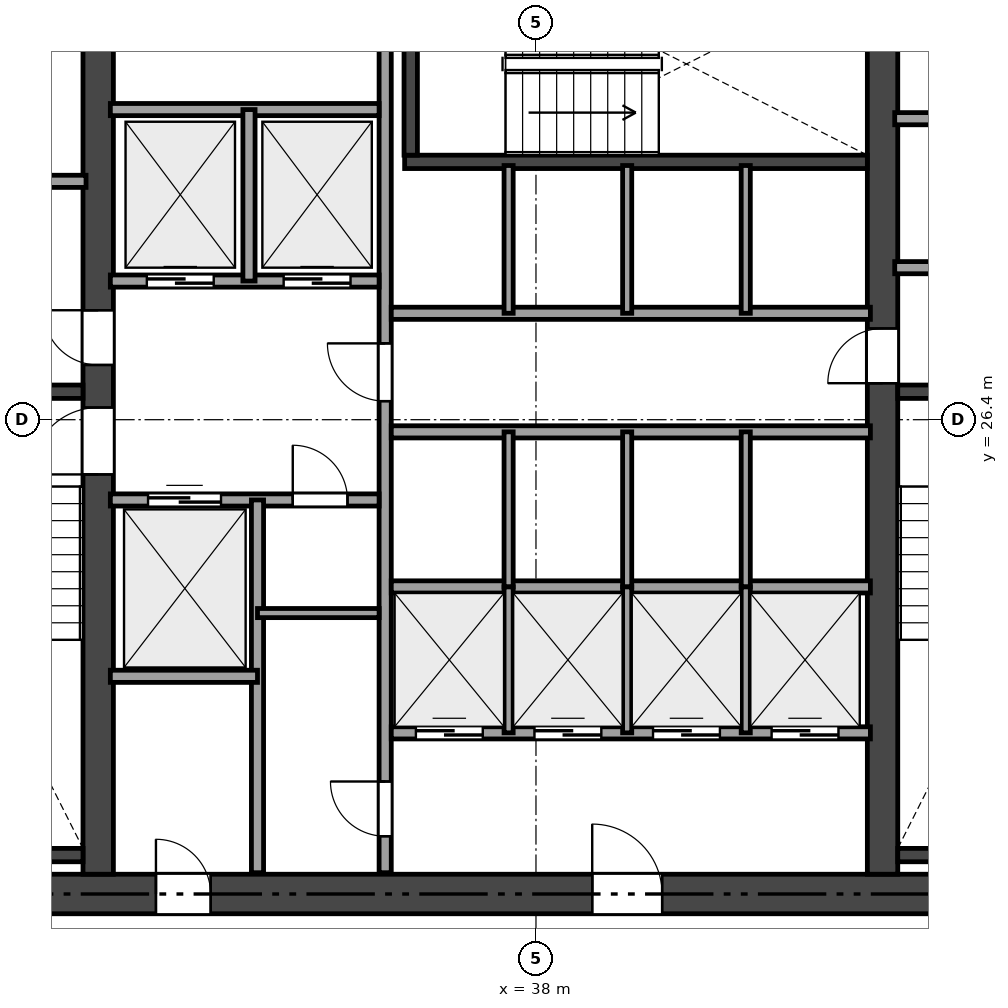
"""IFC4 building model, lengths in metres.
Left out: names, types, materials, properties, quantities, classifications, styles, units other than length and angle.
Written with IfcOpenShell. Run it as: python <this file> out.ifc"""

import sys

from ifc_helpers import new_model, si_unit, direction, frame, frame_2d, origin, place, context, subcontext, project, spatial, rectangle, extrude, element, fill, save


model = new_model("IFC4")
c1 = context("Model", 3, precision=1e-05, world=origin(), true_north=direction((0.0, 1.0)))
c2 = subcontext(c1, "Body", "Model", "MODEL_VIEW")
j1 = project(units=[si_unit("LENGTHUNIT", "METRE"), si_unit("PLANEANGLEUNIT", "RADIAN")], contexts=[c1])
p1 = place(None, origin())
s1 = spatial("IfcSite", under=j1, at=p1, CompositionType="ELEMENT")
p2 = place(p1, origin())
s2 = spatial("IfcBuilding", under=s1, at=p2, CompositionType="ELEMENT")
p3 = place(p2, frame((0.0, 0.0, 51.15)))
s3 = spatial("IfcBuildingStorey", under=s2, at=p3, CompositionType="ELEMENT", Elevation=51.15)
p4 = place(p3, frame((26.475, 18.6, 0.0), z_axis=(0.0, 0.0, 1.0), x_axis=(1.0, 0.0, 0.0)))
e1 = element("IfcWall", 1, at=p4, inside=s3, PredefinedType="SHEAR", context=c2, shape_type="SweptSolid", body=[
    extrude(rectangle(XDim=21.45, YDim=0.65, at=frame_2d((10.725, 0.0))), origin(), (0.0, 0.0, 1.0), 3.17),
])
p5 = place(p4, frame((12.45, 0.0, 0.0)))
e2 = element("IfcOpeningElement", 2, at=p5, cuts=e1, PredefinedType="OPENING", context=c2, shape_type="SweptSolid", body=[
    extrude(rectangle(XDim=1.15, YDim=2.15, at=frame_2d((0.575, 1.075))), frame((0.0, 0.335, 0.0), z_axis=(0.0, -1.0, 0.0), x_axis=(1.0, 0.0, 0.0)), (0.0, 0.0, 1.0), 0.67),
])
p6 = place(p4, frame((5.275, 0.0, 0.0)))
e3 = element("IfcOpeningElement", 3, at=p6, cuts=e1, PredefinedType="OPENING", context=c2, shape_type="SweptSolid", body=[
    extrude(rectangle(XDim=0.9, YDim=2.1, at=frame_2d((0.45, 1.05))), frame((0.0, 0.335, 0.0), z_axis=(0.0, -1.0, 0.0), x_axis=(1.0, 0.0, 0.0)), (0.0, 0.0, 1.0), 0.67),
])
p7 = place(p3, frame((30.8, 18.925, 0.0), z_axis=(0.0, 0.0, 1.0), x_axis=(0.0, 1.0, 0.0)))
e4 = element("IfcWall", 4, at=p7, inside=s3, PredefinedType="SHEAR", context=c2, shape_type="SweptSolid", body=[
    extrude(rectangle(XDim=14.95, YDim=0.5, at=frame_2d((7.475, 0.0))), origin(), (0.0, 0.0, 1.0), 3.17),
])
p8 = place(p7, frame((6.575, 0.0, 0.0)))
e5 = element("IfcOpeningElement", 5, at=p8, cuts=e4, PredefinedType="OPENING", context=c2, shape_type="SweptSolid", body=[
    extrude(rectangle(XDim=1.1, YDim=2.15, at=frame_2d((0.55, 1.075))), frame((0.0, 0.26, 0.0), z_axis=(0.0, -1.0, 0.0), x_axis=(1.0, 0.0, 0.0)), (0.0, 0.0, 1.0), 0.52),
])
p9 = place(p7, frame((8.375, 0.0, 0.0)))
e6 = element("IfcOpeningElement", 6, at=p9, cuts=e4, PredefinedType="OPENING", context=c2, shape_type="SweptSolid", body=[
    extrude(rectangle(XDim=0.9, YDim=2.1, at=frame_2d((0.45, 1.05))), frame((0.0, 0.26, 0.0), z_axis=(0.0, -1.0, 0.0), x_axis=(1.0, 0.0, 0.0)), (0.0, 0.0, 1.0), 0.52),
])
p10 = place(p3, frame((43.7, 18.925, 0.0), z_axis=(0.0, 0.0, 1.0), x_axis=(0.0, 1.0, 0.0)))
e7 = element("IfcWall", 7, at=p10, inside=s3, PredefinedType="SHEAR", context=c2, shape_type="SweptSolid", body=[
    extrude(rectangle(XDim=14.95, YDim=0.5, at=frame_2d((7.475, 0.0))), origin(), (0.0, 0.0, 1.0), 3.17),
])
p11 = place(p10, frame((8.075, 0.0, 0.0)))
e8 = element("IfcOpeningElement", 8, at=p11, cuts=e7, PredefinedType="OPENING", context=c2, shape_type="SweptSolid", body=[
    extrude(rectangle(XDim=0.9, YDim=2.1, at=frame_2d((0.45, 1.05))), frame((0.0, 0.26, 0.0), z_axis=(0.0, -1.0, 0.0), x_axis=(1.0, 0.0, 0.0)), (0.0, 0.0, 1.0), 0.52),
])
for number, where, z_axis, x_axis in (
    (9, (27.125, 26.86, 0.0), (0.0, 0.0, 1.0), (1.0, 0.0, 0.0)),
    (10, (27.125, 19.24, 0.0), (0.0, 0.0, 1.0), (1.0, 0.0, 0.0)),
):
    element("IfcWall", number, at=place(p3, frame(where, z_axis=z_axis, x_axis=x_axis)), inside=s3, PredefinedType="SHEAR", context=c2, shape_type="SweptSolid", body=[
        extrude(rectangle(XDim=3.425, YDim=0.22, at=frame_2d((1.712, 0.0))), origin(), (0.0, 0.0, 1.0), 3.17),
    ])
for number, where, z_axis, x_axis in (
    (11, (43.95, 26.86, 0.0), (0.0, 0.0, 1.0), (1.0, 0.0, 0.0)),
    (12, (43.95, 19.24, 0.0), (0.0, 0.0, 1.0), (1.0, 0.0, 0.0)),
):
    element("IfcWall", number, at=place(p3, frame(where, z_axis=z_axis, x_axis=x_axis)), inside=s3, PredefinedType="SHEAR", context=c2, shape_type="SweptSolid", body=[
        extrude(rectangle(XDim=3.325, YDim=0.22, at=frame_2d((1.663, 0.0))), origin(), (0.0, 0.0, 1.0), 3.17),
    ])
p12 = place(p3, frame((35.84, 30.64, 0.0), z_axis=(0.0, 0.0, 1.0), x_axis=(1.0, 0.0, 0.0)))
e13 = element("IfcWall", 13, at=p12, inside=s3, PredefinedType="SHEAR", context=c2, shape_type="SweptSolid", body=[
    extrude(rectangle(XDim=7.61, YDim=0.22, at=frame_2d((3.805, 0.0))), origin(), (0.0, 0.0, 1.0), 3.17),
])
p13 = place(p3, frame((35.94, 30.75, 0.0), z_axis=(0.0, 0.0, 1.0), x_axis=(0.0, 1.0, 0.0)))
e14 = element("IfcWall", 14, at=p13, inside=s3, PredefinedType="SHEAR", context=c2, shape_type="SweptSolid", body=[
    extrude(rectangle(XDim=3.125, YDim=0.22, at=frame_2d((1.562, 0.0))), origin(), (0.0, 0.0, 1.0), 3.17),
])
p14 = place(p3, frame((27.15, 30.32, 0.0), z_axis=(0.0, 0.0, 1.0), x_axis=(1.0, 0.0, 0.0)))
e15 = element("IfcWall", 15, at=p14, inside=s3, PredefinedType="SOLIDWALL", context=c2, shape_type="SweptSolid", body=[
    extrude(rectangle(XDim=3.45, YDim=0.2, at=frame_2d((1.725, 0.0))), origin(), (0.0, 0.0, 1.0), 3.17),
])
p15 = place(p3, frame((43.9, 28.9, 0.0), z_axis=(0.0, 0.0, 1.0), x_axis=(1.0, 0.0, 0.0)))
e16 = element("IfcWall", 16, at=p15, inside=s3, PredefinedType="SOLIDWALL", context=c2, shape_type="SweptSolid", body=[
    extrude(rectangle(XDim=3.35, YDim=0.2, at=frame_2d((1.675, 0.0))), origin(), (0.0, 0.0, 1.0), 3.17),
])
p16 = place(p15, frame((1.15, 0.0, 0.0)))
e17 = element("IfcOpeningElement", 17, at=p16, cuts=e16, PredefinedType="OPENING", context=c2, shape_type="SweptSolid", body=[
    extrude(rectangle(XDim=0.9, YDim=2.1, at=frame_2d((0.45, 1.05))), frame((0.0, 0.11, 0.0), z_axis=(0.0, -1.0, 0.0), x_axis=(1.0, 0.0, 0.0)), (0.0, 0.0, 1.0), 0.22),
])
p17 = place(p3, frame((43.9, 31.35, 0.0), z_axis=(0.0, 0.0, 1.0), x_axis=(1.0, 0.0, 0.0)))
e18 = element("IfcWall", 18, at=p17, inside=s3, PredefinedType="SOLIDWALL", context=c2, shape_type="SweptSolid", body=[
    extrude(rectangle(XDim=3.35, YDim=0.2, at=frame_2d((1.675, 0.0))), origin(), (0.0, 0.0, 1.0), 3.17),
])
p18 = place(p3, frame((35.52, 18.95, 0.0), z_axis=(0.0, 0.0, 1.0), x_axis=(0.0, 1.0, 0.0)))
e19 = element("IfcWall", 19, at=p18, inside=s3, PredefinedType="SOLIDWALL", context=c2, shape_type="SweptSolid", body=[
    extrude(rectangle(XDim=14.9, YDim=0.2, at=frame_2d((7.45, 0.0))), origin(), (0.0, 0.0, 1.0), 2.691),
])
p19 = place(p18, frame((7.755, 0.0, 0.0)))
e20 = element("IfcOpeningElement", 20, at=p19, cuts=e19, PredefinedType="OPENING", context=c2, shape_type="SweptSolid", body=[
    extrude(rectangle(XDim=0.95, YDim=2.15, at=frame_2d((0.475, 1.075))), frame((0.0, 0.11, 0.0), z_axis=(0.0, -1.0, 0.0), x_axis=(1.0, 0.0, 0.0)), (0.0, 0.0, 1.0), 0.22),
])
p20 = place(p18, frame((0.6, 0.0, 0.0)))
e21 = element("IfcOpeningElement", 21, at=p20, cuts=e19, PredefinedType="OPENING", context=c2, shape_type="SweptSolid", body=[
    extrude(rectangle(XDim=0.9, YDim=2.1, at=frame_2d((0.45, 1.05))), frame((0.0, 0.11, 0.0), z_axis=(0.0, -1.0, 0.0), x_axis=(1.0, 0.0, 0.0)), (0.0, 0.0, 1.0), 0.22),
])
p21 = place(p3, frame((31.0, 28.68, 0.0), z_axis=(0.0, 0.0, 1.0), x_axis=(1.0, 0.0, 0.0)))
e22 = element("IfcWall", 22, at=p21, inside=s3, PredefinedType="SOLIDWALL", context=c2, shape_type="SweptSolid", body=[
    extrude(rectangle(XDim=4.42, YDim=0.2, at=frame_2d((2.21, 0.0))), origin(), (0.0, 0.0, 1.0), 3.17),
])
p22 = place(p21, frame((0.6, 0.0, 0.0)))
e23 = element("IfcOpeningElement", 23, at=p22, cuts=e22, PredefinedType="OPENING", context=c2, shape_type="SweptSolid", body=[
    extrude(rectangle(XDim=1.1, YDim=2.15, at=frame_2d((0.55, 1.075))), frame((0.0, 0.11, 0.0), z_axis=(0.0, -1.0, 0.0), x_axis=(1.0, 0.0, 0.0)), (0.0, 0.0, 1.0), 0.22),
])
p23 = place(p21, frame((2.85, 0.0, 0.0)))
e24 = element("IfcOpeningElement", 24, at=p23, cuts=e22, PredefinedType="OPENING", context=c2, shape_type="SweptSolid", body=[
    extrude(rectangle(XDim=1.1, YDim=2.15, at=frame_2d((0.55, 1.075))), frame((0.0, 0.11, 0.0), z_axis=(0.0, -1.0, 0.0), x_axis=(1.0, 0.0, 0.0)), (0.0, 0.0, 1.0), 0.22),
])
p24 = place(p3, frame((31.0, 31.5, 0.0), z_axis=(0.0, 0.0, 1.0), x_axis=(1.0, 0.0, 0.0)))
e25 = element("IfcWall", 25, at=p24, inside=s3, PredefinedType="SOLIDWALL", context=c2, shape_type="SweptSolid", body=[
    extrude(rectangle(XDim=4.42, YDim=0.2, at=frame_2d((2.21, 0.0))), origin(), (0.0, 0.0, 1.0), 3.17),
])
p25 = place(p3, frame((33.28, 28.68, 0.0), z_axis=(0.0, 0.0, 1.0), x_axis=(0.0, 1.0, 0.0)))
e26 = element("IfcWall", 26, at=p25, inside=s3, PredefinedType="SOLIDWALL", context=c2, shape_type="SweptSolid", body=[
    extrude(rectangle(XDim=2.82, YDim=0.2, at=frame_2d((1.41, 0.0))), origin(), (0.0, 0.0, 1.0), 3.17),
])
p26 = place(p3, frame((31.0, 25.08, 0.0), z_axis=(0.0, 0.0, 1.0), x_axis=(1.0, 0.0, 0.0)))
e27 = element("IfcWall", 27, at=p26, inside=s3, PredefinedType="SOLIDWALL", context=c2, shape_type="SweptSolid", body=[
    extrude(rectangle(XDim=4.42, YDim=0.2, at=frame_2d((2.21, 0.0))), origin(), (0.0, 0.0, 1.0), 3.17),
])
p27 = place(p26, frame((3.0, 0.0, 0.0)))
e28 = element("IfcOpeningElement", 28, at=p27, cuts=e27, PredefinedType="OPENING", context=c2, shape_type="SweptSolid", body=[
    extrude(rectangle(XDim=0.9, YDim=2.1, at=frame_2d((0.45, 1.05))), frame((0.0, 0.11, 0.0), z_axis=(0.0, -1.0, 0.0), x_axis=(1.0, 0.0, 0.0)), (0.0, 0.0, 1.0), 0.22),
])
p28 = place(p26, frame((0.62, 0.0, 0.0)))
e29 = element("IfcOpeningElement", 29, at=p28, cuts=e27, PredefinedType="OPENING", context=c2, shape_type="SweptSolid", body=[
    extrude(rectangle(XDim=1.2, YDim=2.15, at=frame_2d((0.6, 1.075))), frame((0.0, 0.11, 0.0), z_axis=(0.0, -1.0, 0.0), x_axis=(1.0, 0.0, 0.0)), (0.0, 0.0, 1.0), 0.22),
])
p29 = place(p3, frame((33.42, 18.95, 0.0), z_axis=(0.0, 0.0, 1.0), x_axis=(0.0, 1.0, 0.0)))
e30 = element("IfcWall", 30, at=p29, inside=s3, PredefinedType="SOLIDWALL", context=c2, shape_type="SweptSolid", body=[
    extrude(rectangle(XDim=6.13, YDim=0.2, at=frame_2d((3.065, 0.0))), origin(), (0.0, 0.0, 1.0), 2.691),
])
p30 = place(p3, frame((31.0, 22.18, 0.0), z_axis=(0.0, 0.0, 1.0), x_axis=(1.0, 0.0, 0.0)))
e31 = element("IfcWall", 31, at=p30, inside=s3, PredefinedType="SOLIDWALL", context=c2, shape_type="SweptSolid", body=[
    extrude(rectangle(XDim=2.42, YDim=0.2, at=frame_2d((1.21, 0.0))), origin(), (0.0, 0.0, 1.0), 3.17),
])
p31 = place(p3, frame((33.42, 23.22, 0.0), z_axis=(0.0, 0.0, 1.0), x_axis=(1.0, 0.0, 0.0)))
e32 = element("IfcWall", 32, at=p31, inside=s3, PredefinedType="PARTITIONING", context=c2, shape_type="SweptSolid", body=[
    extrude(rectangle(XDim=2.0, YDim=0.15, at=frame_2d((1.0, 0.0))), origin(), (0.0, 0.0, 1.0), 3.17),
])
for number, where, z_axis, x_axis in (
    (33, (35.62, 28.15, 0.0), (0.0, 0.0, 1.0), (1.0, 0.0, 0.0)),
    (34, (35.62, 26.2, 0.0), (0.0, 0.0, 1.0), (1.0, 0.0, 0.0)),
):
    element("IfcWall", number, at=place(p3, frame(where, z_axis=z_axis, x_axis=x_axis)), inside=s3, PredefinedType="SOLIDWALL", context=c2, shape_type="SweptSolid", body=[
        extrude(rectangle(XDim=7.88, YDim=0.2, at=frame_2d((3.94, 0.0))), origin(), (0.0, 0.0, 1.0), 3.17),
    ])
p32 = place(p3, frame((35.62, 23.65, 0.0), z_axis=(0.0, 0.0, 1.0), x_axis=(1.0, 0.0, 0.0)))
e35 = element("IfcWall", 35, at=p32, inside=s3, PredefinedType="SOLIDWALL", context=c2, shape_type="SweptSolid", body=[
    extrude(rectangle(XDim=7.88, YDim=0.2, at=frame_2d((3.94, 0.0))), origin(), (0.0, 0.0, 1.0), 2.691),
])
p33 = place(p3, frame((35.62, 21.25, 0.0), z_axis=(0.0, 0.0, 1.0), x_axis=(1.0, 0.0, 0.0)))
e36 = element("IfcWall", 36, at=p33, inside=s3, PredefinedType="SOLIDWALL", context=c2, shape_type="SweptSolid", body=[
    extrude(rectangle(XDim=7.88, YDim=0.2, at=frame_2d((3.94, 0.0))), origin(), (0.0, 0.0, 1.0), 3.17),
])
p34 = place(p33, frame((0.405, 0.0, 0.0)))
e37 = element("IfcOpeningElement", 37, at=p34, cuts=e36, PredefinedType="OPENING", context=c2, shape_type="SweptSolid", body=[
    extrude(rectangle(XDim=1.1, YDim=2.15, at=frame_2d((0.55, 1.075))), frame((0.0, 0.11, 0.0), z_axis=(0.0, -1.0, 0.0), x_axis=(1.0, 0.0, 0.0)), (0.0, 0.0, 1.0), 0.22),
])
p35 = place(p33, frame((2.355, 0.0, 0.0)))
e38 = element("IfcOpeningElement", 38, at=p35, cuts=e36, PredefinedType="OPENING", context=c2, shape_type="SweptSolid", body=[
    extrude(rectangle(XDim=1.1, YDim=2.15, at=frame_2d((0.55, 1.075))), frame((0.0, 0.11, 0.0), z_axis=(0.0, -1.0, 0.0), x_axis=(1.0, 0.0, 0.0)), (0.0, 0.0, 1.0), 0.22),
])
p36 = place(p33, frame((4.305, 0.0, 0.0)))
e39 = element("IfcOpeningElement", 39, at=p36, cuts=e36, PredefinedType="OPENING", context=c2, shape_type="SweptSolid", body=[
    extrude(rectangle(XDim=1.1, YDim=2.15, at=frame_2d((0.55, 1.075))), frame((0.0, 0.11, 0.0), z_axis=(0.0, -1.0, 0.0), x_axis=(1.0, 0.0, 0.0)), (0.0, 0.0, 1.0), 0.22),
])
p37 = place(p33, frame((6.255, 0.0, 0.0)))
e40 = element("IfcOpeningElement", 40, at=p37, cuts=e36, PredefinedType="OPENING", context=c2, shape_type="SweptSolid", body=[
    extrude(rectangle(XDim=1.1, YDim=2.15, at=frame_2d((0.55, 1.075))), frame((0.0, 0.11, 0.0), z_axis=(0.0, -1.0, 0.0), x_axis=(1.0, 0.0, 0.0)), (0.0, 0.0, 1.0), 0.22),
])
for number, where, z_axis, x_axis in (
    (41, (37.55, 28.15, 0.0), (0.0, 0.0, 1.0), (0.0, 1.0, 0.0)),
    (42, (39.5, 28.15, 0.0), (0.0, 0.0, 1.0), (0.0, 1.0, 0.0)),
    (43, (41.45, 28.15, 0.0), (0.0, 0.0, 1.0), (0.0, 1.0, 0.0)),
):
    element("IfcWall", number, at=place(p3, frame(where, z_axis=z_axis, x_axis=x_axis)), inside=s3, PredefinedType="PARTITIONING", context=c2, shape_type="SweptSolid", body=[
        extrude(rectangle(XDim=2.43, YDim=0.15, at=frame_2d((1.215, 0.0))), origin(), (0.0, 0.0, 1.0), 3.17),
    ])
for number, where, z_axis, x_axis in (
    (44, (37.55, 23.65, 0.0), (0.0, 0.0, 1.0), (0.0, 1.0, 0.0)),
    (45, (39.5, 23.65, 0.0), (0.0, 0.0, 1.0), (0.0, 1.0, 0.0)),
    (46, (41.45, 23.65, 0.0), (0.0, 0.0, 1.0), (0.0, 1.0, 0.0)),
):
    element("IfcWall", number, at=place(p3, frame(where, z_axis=z_axis, x_axis=x_axis)), inside=s3, PredefinedType="PARTITIONING", context=c2, shape_type="SweptSolid", body=[
        extrude(rectangle(XDim=2.55, YDim=0.15, at=frame_2d((1.275, 0.0))), origin(), (0.0, 0.0, 1.0), 2.691),
    ])
for number, where, z_axis, x_axis in (
    (47, (37.55, 21.25, 0.0), (0.0, 0.0, 1.0), (0.0, 1.0, 0.0)),
    (48, (39.5, 21.25, 0.0), (0.0, 0.0, 1.0), (0.0, 1.0, 0.0)),
    (49, (41.45, 21.25, 0.0), (0.0, 0.0, 1.0), (0.0, 1.0, 0.0)),
):
    element("IfcWall", number, at=place(p3, frame(where, z_axis=z_axis, x_axis=x_axis)), inside=s3, PredefinedType="PARTITIONING", context=c2, shape_type="SweptSolid", body=[
        extrude(rectangle(XDim=2.4, YDim=0.15, at=frame_2d((1.2, 0.0))), origin(), (0.0, 0.0, 1.0), 2.691),
    ])
p38 = place(p8, origin())
e50 = element("IfcDoor", 50, at=p38, inside=s3, OperationType="SINGLE_SWING_LEFT", PredefinedType="DOOR", context=c2, shape_type="SweptSolid", body=[
    extrude(rectangle(XDim=1.1, YDim=2.15, at=frame_2d((0.55, 1.075))), frame((0.0, 0.025, 0.0), z_axis=(0.0, -1.0, 0.0), x_axis=(1.0, 0.0, 0.0)), (0.0, 0.0, 1.0), 0.05),
])
fill(e5, e50)
p39 = place(p19, origin())
e51 = element("IfcDoor", 51, at=p39, inside=s3, OperationType="SINGLE_SWING_RIGHT", PredefinedType="DOOR", context=c2, shape_type="SweptSolid", body=[
    extrude(rectangle(XDim=0.95, YDim=2.15, at=frame_2d((0.475, 1.075))), frame((0.0, 0.025, 0.0), z_axis=(0.0, -1.0, 0.0), x_axis=(1.0, 0.0, 0.0)), (0.0, 0.0, 1.0), 0.05),
])
fill(e20, e51)
p40 = place(p11, origin())
e52 = element("IfcDoor", 52, at=p40, inside=s3, OperationType="SINGLE_SWING_LEFT", PredefinedType="DOOR", context=c2, shape_type="SweptSolid", body=[
    extrude(rectangle(XDim=0.9, YDim=2.1, at=frame_2d((0.45, 1.05))), frame((0.0, 0.025, 0.0), z_axis=(0.0, -1.0, 0.0), x_axis=(1.0, 0.0, 0.0)), (0.0, 0.0, 1.0), 0.05),
])
fill(e8, e52)
p41 = place(p5, origin())
e53 = element("IfcDoor", 53, at=p41, inside=s3, OperationType="SINGLE_SWING_LEFT", PredefinedType="DOOR", context=c2, shape_type="SweptSolid", body=[
    extrude(rectangle(XDim=1.15, YDim=2.15, at=frame_2d((0.575, 1.075))), frame((0.0, 0.025, 0.0), z_axis=(0.0, -1.0, 0.0), x_axis=(1.0, 0.0, 0.0)), (0.0, 0.0, 1.0), 0.05),
])
fill(e2, e53)
p42 = place(p9, origin())
e54 = element("IfcDoor", 54, at=p42, inside=s3, OperationType="SINGLE_SWING_RIGHT", PredefinedType="DOOR", context=c2, shape_type="SweptSolid", body=[
    extrude(rectangle(XDim=0.9, YDim=2.1, at=frame_2d((0.45, 1.05))), frame((0.0, 0.025, 0.0), z_axis=(0.0, -1.0, 0.0), x_axis=(1.0, 0.0, 0.0)), (0.0, 0.0, 1.0), 0.05),
])
fill(e6, e54)
p43 = place(p6, origin())
e55 = element("IfcDoor", 55, at=p43, inside=s3, OperationType="SINGLE_SWING_LEFT", PredefinedType="DOOR", context=c2, shape_type="SweptSolid", body=[
    extrude(rectangle(XDim=0.9, YDim=2.1, at=frame_2d((0.45, 1.05))), frame((0.0, 0.025, 0.0), z_axis=(0.0, -1.0, 0.0), x_axis=(1.0, 0.0, 0.0)), (0.0, 0.0, 1.0), 0.05),
])
fill(e3, e55)
p44 = place(p20, origin())
e56 = element("IfcDoor", 56, at=p44, inside=s3, OperationType="SINGLE_SWING_RIGHT", PredefinedType="DOOR", context=c2, shape_type="SweptSolid", body=[
    extrude(rectangle(XDim=0.9, YDim=2.1, at=frame_2d((0.45, 1.05))), frame((0.0, 0.025, 0.0), z_axis=(0.0, -1.0, 0.0), x_axis=(1.0, 0.0, 0.0)), (0.0, 0.0, 1.0), 0.05),
])
fill(e21, e56)
p45 = place(p27, origin())
e57 = element("IfcDoor", 57, at=p45, inside=s3, OperationType="SINGLE_SWING_LEFT", PredefinedType="DOOR", context=c2, shape_type="SweptSolid", body=[
    extrude(rectangle(XDim=0.9, YDim=2.1, at=frame_2d((0.45, 1.05))), frame((0.0, 0.025, 0.0), z_axis=(0.0, -1.0, 0.0), x_axis=(1.0, 0.0, 0.0)), (0.0, 0.0, 1.0), 0.05),
])
fill(e28, e57)
p46 = place(p22, origin())
e58 = element("IfcDoor", 58, at=p46, inside=s3, OperationType="SLIDING_TO_LEFT", PredefinedType="DOOR", context=c2, shape_type="SweptSolid", body=[
    extrude(rectangle(XDim=1.1, YDim=2.15, at=frame_2d((0.55, 1.075))), frame((0.0, 0.025, 0.0), z_axis=(0.0, -1.0, 0.0), x_axis=(1.0, 0.0, 0.0)), (0.0, 0.0, 1.0), 0.05),
])
fill(e23, e58)
p47 = place(p23, origin())
e59 = element("IfcDoor", 59, at=p47, inside=s3, OperationType="SLIDING_TO_LEFT", PredefinedType="DOOR", context=c2, shape_type="SweptSolid", body=[
    extrude(rectangle(XDim=1.1, YDim=2.15, at=frame_2d((0.55, 1.075))), frame((0.0, 0.025, 0.0), z_axis=(0.0, -1.0, 0.0), x_axis=(1.0, 0.0, 0.0)), (0.0, 0.0, 1.0), 0.05),
])
fill(e24, e59)
p48 = place(p28, origin())
e60 = element("IfcDoor", 60, at=p48, inside=s3, OperationType="SLIDING_TO_LEFT", PredefinedType="DOOR", context=c2, shape_type="SweptSolid", body=[
    extrude(rectangle(XDim=1.2, YDim=2.15, at=frame_2d((0.6, 1.075))), frame((0.0, 0.025, 0.0), z_axis=(0.0, -1.0, 0.0), x_axis=(1.0, 0.0, 0.0)), (0.0, 0.0, 1.0), 0.05),
])
fill(e29, e60)
p49 = place(p34, origin())
e61 = element("IfcDoor", 61, at=p49, inside=s3, OperationType="SLIDING_TO_LEFT", PredefinedType="DOOR", context=c2, shape_type="SweptSolid", body=[
    extrude(rectangle(XDim=1.1, YDim=2.15, at=frame_2d((0.55, 1.075))), frame((0.0, 0.025, 0.0), z_axis=(0.0, -1.0, 0.0), x_axis=(1.0, 0.0, 0.0)), (0.0, 0.0, 1.0), 0.05),
])
fill(e37, e61)
p50 = place(p35, origin())
e62 = element("IfcDoor", 62, at=p50, inside=s3, OperationType="SLIDING_TO_LEFT", PredefinedType="DOOR", context=c2, shape_type="SweptSolid", body=[
    extrude(rectangle(XDim=1.1, YDim=2.15, at=frame_2d((0.55, 1.075))), frame((0.0, 0.025, 0.0), z_axis=(0.0, -1.0, 0.0), x_axis=(1.0, 0.0, 0.0)), (0.0, 0.0, 1.0), 0.05),
])
fill(e38, e62)
p51 = place(p36, origin())
e63 = element("IfcDoor", 63, at=p51, inside=s3, OperationType="SLIDING_TO_LEFT", PredefinedType="DOOR", context=c2, shape_type="SweptSolid", body=[
    extrude(rectangle(XDim=1.1, YDim=2.15, at=frame_2d((0.55, 1.075))), frame((0.0, 0.025, 0.0), z_axis=(0.0, -1.0, 0.0), x_axis=(1.0, 0.0, 0.0)), (0.0, 0.0, 1.0), 0.05),
])
fill(e39, e63)
p52 = place(p37, origin())
e64 = element("IfcDoor", 64, at=p52, inside=s3, OperationType="SLIDING_TO_LEFT", PredefinedType="DOOR", context=c2, shape_type="SweptSolid", body=[
    extrude(rectangle(XDim=1.1, YDim=2.15, at=frame_2d((0.55, 1.075))), frame((0.0, 0.025, 0.0), z_axis=(0.0, -1.0, 0.0), x_axis=(1.0, 0.0, 0.0)), (0.0, 0.0, 1.0), 0.05),
])
fill(e40, e64)
save(model, sys.argv[1])
